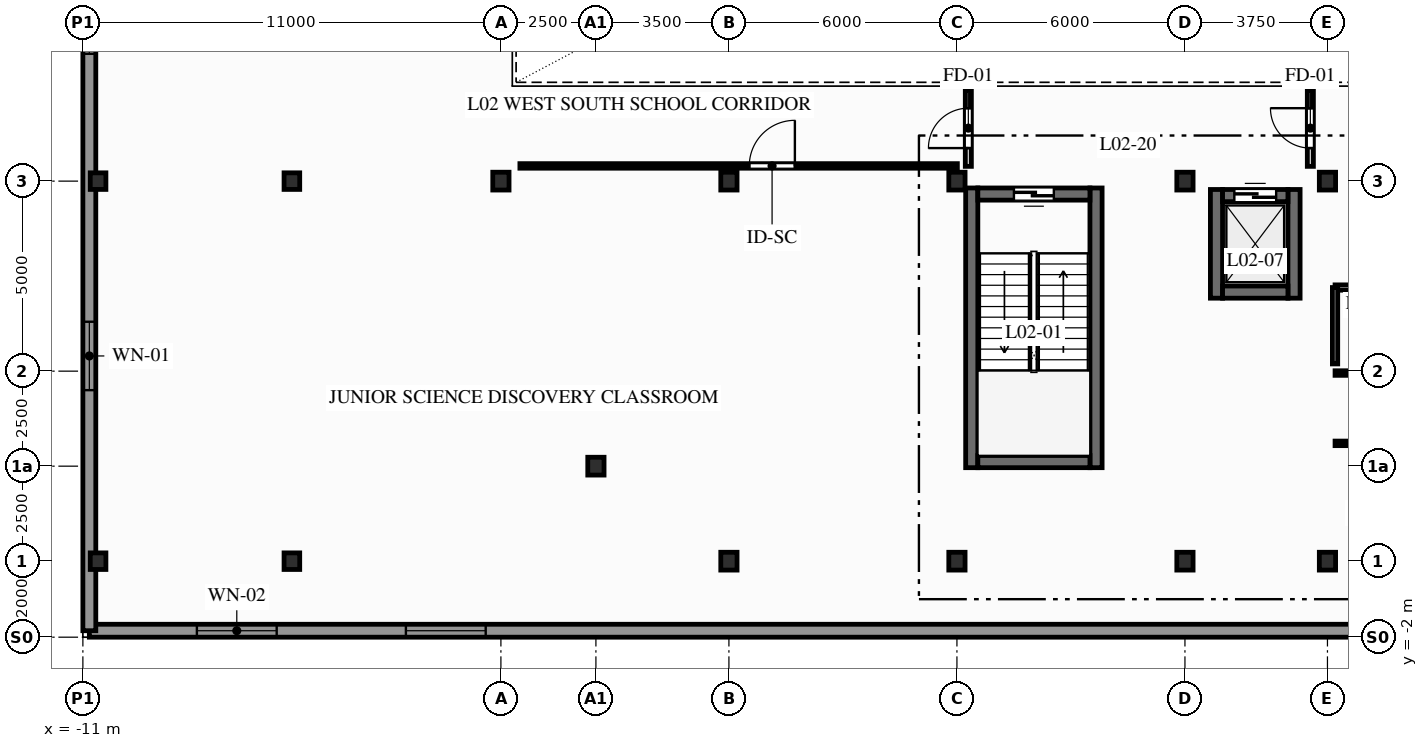
"""IFC4 building model, lengths in metres.
Left out: names, types, materials, properties, quantities, classifications, styles, units other than length and angle.
Written with IfcOpenShell. Run it as: python <this file> out.ifc"""

import sys

from ifc_helpers import new_model, si_unit, direction, frame, frame_2d, origin, origin_2d, place, context, subcontext, project, spatial, rectangle, i_section, extrude, element, fill, save


model = new_model("IFC4")
c1 = context("Model", 3, precision=1e-05, world=origin(), true_north=direction((0.0, 1.0)))
c2 = subcontext(c1, "Body", "Model", "MODEL_VIEW")
j1 = project(units=[si_unit("LENGTHUNIT", "METRE"), si_unit("PLANEANGLEUNIT", "RADIAN")], contexts=[c1])
p1 = place(None, origin())
s1 = spatial("IfcSite", under=j1, at=p1, CompositionType="ELEMENT")
p2 = place(p1, origin())
s2 = spatial("IfcBuilding", under=s1, at=p2, CompositionType="ELEMENT")
p3 = place(p2, frame((0.0, 0.0, 9.0)))
s3 = spatial("IfcBuildingStorey", under=s2, at=p3, CompositionType="ELEMENT", Elevation=9.0)
for number, where, z_axis, x_axis in (
    (1, (-10.6, 0.0, 0.0), (0.0, 0.0, 1.0), (1.0, 0.0, 0.0)),
    (2, (-10.6, 10.0, 0.0), (0.0, 0.0, 1.0), (1.0, 0.0, 0.0)),
    (3, (-5.5, 0.0, 0.0), (0.0, 0.0, 1.0), (1.0, 0.0, 0.0)),
    (4, (-5.5, 10.0, 0.0), (0.0, 0.0, 1.0), (1.0, 0.0, 0.0)),
):
    element("IfcColumn", number, at=place(p3, frame(where, z_axis=z_axis, x_axis=x_axis)), inside=s3, PredefinedType="COLUMN", context=c2, shape_type="SweptSolid", body=[
        extrude(i_section(OverallWidth=0.412, OverallDepth=0.437, WebThickness=0.036, FlangeThickness=0.058, FilletRadius=0.015, at=origin_2d()), origin(), (0.0, 0.0, 1.0), 4.5),
    ])
for number, where, z_axis, x_axis in (
    (5, (0.0, 10.0, 0.0), (0.0, 0.0, 1.0), (1.0, 0.0, 0.0)),
    (6, (2.5, 2.5, 0.0), (0.0, 0.0, 1.0), (1.0, 0.0, 0.0)),
    (7, (6.0, 0.0, 0.0), (0.0, 0.0, 1.0), (1.0, 0.0, 0.0)),
    (8, (6.0, 10.0, 0.0), (0.0, 0.0, 1.0), (1.0, 0.0, 0.0)),
    (9, (12.0, 0.0, 0.0), (0.0, 0.0, 1.0), (1.0, 0.0, 0.0)),
    (10, (12.0, 10.0, 0.0), (0.0, 0.0, 1.0), (1.0, 0.0, 0.0)),
    (11, (18.0, 0.0, 0.0), (0.0, 0.0, 1.0), (1.0, 0.0, 0.0)),
    (12, (18.0, 10.0, 0.0), (0.0, 0.0, 1.0), (1.0, 0.0, 0.0)),
    (13, (21.75, 0.0, 0.0), (0.0, 0.0, 1.0), (1.0, 0.0, 0.0)),
    (14, (21.75, 10.0, 0.0), (0.0, 0.0, 1.0), (1.0, 0.0, 0.0)),
):
    element("IfcColumn", number, at=place(p3, frame(where, z_axis=z_axis, x_axis=x_axis)), inside=s3, PredefinedType="COLUMN", context=c2, shape_type="SweptSolid", body=[
        extrude(i_section(OverallWidth=0.428, OverallDepth=0.469, WebThickness=0.078, FlangeThickness=0.125, FilletRadius=0.015, at=origin_2d()), origin(), (0.0, 0.0, 1.0), 4.5),
    ])
p4 = place(p3, frame((-10.83, -1.83, 0.0), z_axis=(0.0, 0.0, 1.0), x_axis=(1.0, 0.0, 0.0)))
e15 = element("IfcWall", 15, at=p4, inside=s3, PredefinedType="STANDARD", context=c2, shape_type="SweptSolid", body=[
    extrude(rectangle(XDim=81.66, YDim=0.34, at=frame_2d((40.83, 0.0))), origin(), (0.0, 0.0, 1.0), 4.22),
])
p5 = place(p4, frame((2.83, 0.0, 0.9)))
e16 = element("IfcOpeningElement", 16, at=p5, cuts=e15, PredefinedType="OPENING", context=c2, shape_type="SweptSolid", body=[
    extrude(rectangle(XDim=2.1, YDim=2.05, at=frame_2d((1.05, 1.025))), frame((0.0, 0.18, 0.0), z_axis=(0.0, -1.0, 0.0), x_axis=(1.0, 0.0, 0.0)), (0.0, 0.0, 1.0), 0.36),
])
p6 = place(p4, frame((8.33, 0.0, 0.9)))
e17 = element("IfcOpeningElement", 17, at=p6, cuts=e15, PredefinedType="OPENING", context=c2, shape_type="SweptSolid", body=[
    extrude(rectangle(XDim=2.1, YDim=2.05, at=frame_2d((1.05, 1.025))), frame((0.0, 0.18, 0.0), z_axis=(0.0, -1.0, 0.0), x_axis=(1.0, 0.0, 0.0)), (0.0, 0.0, 1.0), 0.36),
])
p7 = place(p4, frame((71.33, 0.0, 0.9)))
e18 = element("IfcOpeningElement", 18, at=p7, cuts=e15, PredefinedType="OPENING", context=c2, shape_type="SweptSolid", body=[
    extrude(rectangle(XDim=2.1, YDim=2.05, at=frame_2d((1.05, 1.025))), frame((0.0, 0.18, 0.0), z_axis=(0.0, -1.0, 0.0), x_axis=(1.0, 0.0, 0.0)), (0.0, 0.0, 1.0), 0.36),
])
p8 = place(p4, frame((76.83, 0.0, 0.9)))
e19 = element("IfcOpeningElement", 19, at=p8, cuts=e15, PredefinedType="OPENING", context=c2, shape_type="SweptSolid", body=[
    extrude(rectangle(XDim=2.1, YDim=2.05, at=frame_2d((1.05, 1.025))), frame((0.0, 0.18, 0.0), z_axis=(0.0, -1.0, 0.0), x_axis=(1.0, 0.0, 0.0)), (0.0, 0.0, 1.0), 0.36),
])
p9 = place(p3, frame((-10.83, 34.6, 0.0), z_axis=(0.0, 0.0, 1.0), x_axis=(0.0, -1.0, 0.0)))
e20 = element("IfcWall", 20, at=p9, inside=s3, PredefinedType="STANDARD", context=c2, shape_type="SweptSolid", body=[
    extrude(rectangle(XDim=36.43, YDim=0.34, at=frame_2d((18.215, 0.0))), origin(), (0.0, 0.0, 1.0), 3.583),
])
p10 = place(p9, frame((28.3, 0.0, 0.9)))
e21 = element("IfcOpeningElement", 21, at=p10, cuts=e20, PredefinedType="OPENING", context=c2, shape_type="SweptSolid", body=[
    extrude(rectangle(XDim=1.8, YDim=1.95, at=frame_2d((0.9, 0.975))), frame((0.0, 0.18, 0.0), z_axis=(0.0, -1.0, 0.0), x_axis=(1.0, 0.0, 0.0)), (0.0, 0.0, 1.0), 0.36),
])
p11 = place(p9, frame((19.45, 0.0, 0.9)))
e22 = element("IfcOpeningElement", 22, at=p11, cuts=e20, PredefinedType="OPENING", context=c2, shape_type="SweptSolid", body=[
    extrude(rectangle(XDim=1.8, YDim=1.95, at=frame_2d((0.9, 0.975))), frame((0.0, 0.18, 0.0), z_axis=(0.0, -1.0, 0.0), x_axis=(1.0, 0.0, 0.0)), (0.0, 0.0, 1.0), 0.36),
])
p12 = place(p9, frame((13.6, 0.0, 0.9)))
e23 = element("IfcOpeningElement", 23, at=p12, cuts=e20, PredefinedType="OPENING", context=c2, shape_type="SweptSolid", body=[
    extrude(rectangle(XDim=1.8, YDim=1.95, at=frame_2d((0.9, 0.975))), frame((0.0, 0.18, 0.0), z_axis=(0.0, -1.0, 0.0), x_axis=(1.0, 0.0, 0.0)), (0.0, 0.0, 1.0), 0.36),
])
p13 = place(p9, frame((6.0, 0.0, 0.9)))
e24 = element("IfcOpeningElement", 24, at=p13, cuts=e20, PredefinedType="OPENING", context=c2, shape_type="SweptSolid", body=[
    extrude(rectangle(XDim=1.8, YDim=1.95, at=frame_2d((0.9, 0.975))), frame((0.0, 0.18, 0.0), z_axis=(0.0, -1.0, 0.0), x_axis=(1.0, 0.0, 0.0)), (0.0, 0.0, 1.0), 0.36),
])
for number, where, z_axis, x_axis in (
    (25, (12.39, 2.46, 0.0), (0.0, 0.0, 1.0), (0.0, 1.0, 0.0)),
    (26, (15.66, 2.46, 0.0), (0.0, 0.0, 1.0), (0.0, 1.0, 0.0)),
):
    element("IfcWall", number, at=place(p3, frame(where, z_axis=z_axis, x_axis=x_axis)), inside=s3, PredefinedType="SHEAR", context=c2, shape_type="SweptSolid", body=[
        extrude(rectangle(XDim=7.36, YDim=0.32, at=frame_2d((3.68, 0.0))), origin(), (0.0, 0.0, 1.0), 4.22),
    ])
p14 = place(p3, frame((12.55, 2.62, 0.0), z_axis=(0.0, 0.0, 1.0), x_axis=(1.0, 0.0, 0.0)))
e27 = element("IfcWall", 27, at=p14, inside=s3, PredefinedType="SHEAR", context=c2, shape_type="SweptSolid", body=[
    extrude(rectangle(XDim=2.95, YDim=0.32, at=frame_2d((1.475, 0.0))), origin(), (0.0, 0.0, 1.0), 4.22),
])
p15 = place(p3, frame((15.5, 9.66, 0.0), z_axis=(0.0, 0.0, 1.0), x_axis=(-1.0, 0.0, 0.0)))
e28 = element("IfcWall", 28, at=p15, inside=s3, PredefinedType="SHEAR", context=c2, shape_type="SweptSolid", body=[
    extrude(rectangle(XDim=2.95, YDim=0.32, at=frame_2d((1.475, 0.0))), origin(), (0.0, 0.0, 1.0), 4.22),
])
p16 = place(p15, frame((0.95, 0.0, 0.0)))
e29 = element("IfcOpeningElement", 29, at=p16, cuts=e28, PredefinedType="OPENING", context=c2, shape_type="SweptSolid", body=[
    extrude(rectangle(XDim=1.05, YDim=2.06, at=frame_2d((0.525, 1.03))), frame((0.0, 0.17, 0.0), z_axis=(0.0, -1.0, 0.0), x_axis=(1.0, 0.0, 0.0)), (0.0, 0.0, 1.0), 0.34),
])
for number, where, z_axis, x_axis in (
    (30, (18.83, 6.92, 0.0), (0.0, 0.0, 1.0), (0.0, 1.0, 0.0)),
    (31, (20.87, 6.92, 0.0), (0.0, 0.0, 1.0), (0.0, 1.0, 0.0)),
):
    element("IfcWall", number, at=place(p3, frame(where, z_axis=z_axis, x_axis=x_axis)), inside=s3, PredefinedType="SHEAR", context=c2, shape_type="SweptSolid", body=[
        extrude(rectangle(XDim=2.86, YDim=0.32, at=frame_2d((1.43, 0.0))), origin(), (0.0, 0.0, 1.0), 4.22),
    ])
p17 = place(p3, frame((18.99, 7.08, 0.0), z_axis=(0.0, 0.0, 1.0), x_axis=(1.0, 0.0, 0.0)))
e32 = element("IfcWall", 32, at=p17, inside=s3, PredefinedType="SHEAR", context=c2, shape_type="SweptSolid", body=[
    extrude(rectangle(XDim=1.72, YDim=0.32, at=frame_2d((0.86, 0.0))), origin(), (0.0, 0.0, 1.0), 4.22),
])
p18 = place(p3, frame((18.99, 9.62, 0.0), z_axis=(0.0, 0.0, 1.0), x_axis=(1.0, 0.0, 0.0)))
e33 = element("IfcWall", 33, at=p18, inside=s3, PredefinedType="SHEAR", context=c2, shape_type="SweptSolid", body=[
    extrude(rectangle(XDim=1.72, YDim=0.32, at=frame_2d((0.86, 0.0))), origin(), (0.0, 0.0, 1.0), 4.22),
])
p19 = place(p18, frame((0.31, 0.0, 0.0)))
e34 = element("IfcOpeningElement", 34, at=p19, cuts=e33, PredefinedType="OPENING", context=c2, shape_type="SweptSolid", body=[
    extrude(rectangle(XDim=1.1, YDim=2.06, at=frame_2d((0.55, 1.03))), frame((0.0, 0.17, 0.0), z_axis=(0.0, -1.0, 0.0), x_axis=(1.0, 0.0, 0.0)), (0.0, 0.0, 1.0), 0.34),
])
p20 = place(p3, frame((21.95, 3.1, 0.0), z_axis=(0.0, 0.0, 1.0), x_axis=(1.0, 0.0, 0.0)))
e35 = element("IfcWall", 35, at=p20, inside=s3, PredefinedType="PARTITIONING", context=c2, shape_type="SweptSolid", body=[
    extrude(rectangle(XDim=3.781, YDim=0.12, at=frame_2d((1.891, 0.0))), origin(), (0.0, 0.0, 1.0), 4.22),
])
p21 = place(p20, frame((1.366, 0.0, 0.0)))
e36 = element("IfcOpeningElement", 36, at=p21, cuts=e35, PredefinedType="OPENING", context=c2, shape_type="SweptSolid", body=[
    extrude(rectangle(XDim=1.05, YDim=2.06, at=frame_2d((0.525, 1.03))), frame((0.0, 0.07, 0.0), z_axis=(0.0, -1.0, 0.0), x_axis=(1.0, 0.0, 0.0)), (0.0, 0.0, 1.0), 0.14),
])
p22 = place(p3, frame((21.95, 4.95, 0.0), z_axis=(0.0, 0.0, 1.0), x_axis=(1.0, 0.0, 0.0)))
e37 = element("IfcWall", 37, at=p22, inside=s3, PredefinedType="PARTITIONING", context=c2, shape_type="SweptSolid", body=[
    extrude(rectangle(XDim=5.231, YDim=0.12, at=frame_2d((2.616, 0.0))), origin(), (0.0, 0.0, 1.0), 3.738),
])
p23 = place(p22, frame((2.141, 0.0, 0.0)))
e38 = element("IfcOpeningElement", 38, at=p23, cuts=e37, PredefinedType="OPENING", context=c2, shape_type="SweptSolid", body=[
    extrude(rectangle(XDim=0.95, YDim=2.05, at=frame_2d((0.475, 1.025))), frame((0.0, 0.07, 0.0), z_axis=(0.0, -1.0, 0.0), x_axis=(1.0, 0.0, 0.0)), (0.0, 0.0, 1.0), 0.14),
])
p24 = place(p3, frame((12.3, 10.389, 0.0), z_axis=(0.0, 0.0, 1.0), x_axis=(0.0, 1.0, 0.0)))
e39 = element("IfcWall", 39, at=p24, inside=s3, PredefinedType="PARTITIONING", context=c2, shape_type="SweptSolid", body=[
    extrude(rectangle(XDim=2.011, YDim=0.16, at=frame_2d((1.006, 0.0))), origin(), (0.0, 0.0, 1.0), 4.22),
])
p25 = place(p24, frame((0.481, 0.0, 0.0)))
e40 = element("IfcOpeningElement", 40, at=p25, cuts=e39, PredefinedType="OPENING", context=c2, shape_type="SweptSolid", body=[
    extrude(rectangle(XDim=1.05, YDim=2.06, at=frame_2d((0.525, 1.03))), frame((0.0, 0.09, 0.0), z_axis=(0.0, -1.0, 0.0), x_axis=(1.0, 0.0, 0.0)), (0.0, 0.0, 1.0), 0.18),
])
p26 = place(p3, frame((21.3, 10.389, 0.0), z_axis=(0.0, 0.0, 1.0), x_axis=(0.0, 1.0, 0.0)))
e41 = element("IfcWall", 41, at=p26, inside=s3, PredefinedType="PARTITIONING", context=c2, shape_type="SweptSolid", body=[
    extrude(rectangle(XDim=2.011, YDim=0.16, at=frame_2d((1.006, 0.0))), origin(), (0.0, 0.0, 1.0), 4.22),
])
p27 = place(p26, frame((0.481, 0.0, 0.0)))
e42 = element("IfcOpeningElement", 42, at=p27, cuts=e41, PredefinedType="OPENING", context=c2, shape_type="SweptSolid", body=[
    extrude(rectangle(XDim=1.05, YDim=2.06, at=frame_2d((0.525, 1.03))), frame((0.0, 0.09, 0.0), z_axis=(0.0, -1.0, 0.0), x_axis=(1.0, 0.0, 0.0)), (0.0, 0.0, 1.0), 0.18),
])
p28 = place(p3, frame((0.5, 10.4, 0.0), z_axis=(0.0, 0.0, 1.0), x_axis=(1.0, 0.0, 0.0)))
e43 = element("IfcWall", 43, at=p28, inside=s3, PredefinedType="PARTITIONING", context=c2, shape_type="SweptSolid", body=[
    extrude(rectangle(XDim=11.511, YDim=0.12, at=frame_2d((5.756, 0.0))), origin(), (0.0, 0.0, 1.0), 3.344),
])
p29 = place(p28, frame((6.036, 0.0, 0.0)))
e44 = element("IfcOpeningElement", 44, at=p29, cuts=e43, PredefinedType="OPENING", context=c2, shape_type="SweptSolid", body=[
    extrude(rectangle(XDim=1.2, YDim=2.08, at=frame_2d((0.6, 1.04))), frame((0.0, 0.07, 0.0), z_axis=(0.0, -1.0, 0.0), x_axis=(1.0, 0.0, 0.0)), (0.0, 0.0, 1.0), 0.14),
])
p30 = place(p3, frame((21.95, 7.2, 0.0), z_axis=(0.0, 0.0, 1.0), x_axis=(1.0, 0.0, 0.0)))
e45 = element("IfcWall", 45, at=p30, inside=s3, PredefinedType="PARTITIONING", context=c2, shape_type="SweptSolid", body=[
    extrude(rectangle(XDim=4.98, YDim=0.14, at=frame_2d((2.49, 0.0))), origin(), (0.0, 0.0, 1.0), 4.22),
])
p31 = place(p3, frame((21.95, 5.19, 0.0), z_axis=(0.0, 0.0, 1.0), x_axis=(0.0, 1.0, 0.0)))
e46 = element("IfcWall", 46, at=p31, inside=s3, PredefinedType="PARTITIONING", context=c2, shape_type="SweptSolid", body=[
    extrude(rectangle(XDim=2.01, YDim=0.14, at=frame_2d((1.005, 0.0))), origin(), (0.0, 0.0, 1.0), 3.344),
])
p32 = place(p5, origin())
e47 = element("IfcWindow", 47, at=p32, inside=s3, PartitioningType="SINGLE_PANEL", PredefinedType="WINDOW", context=c2, shape_type="SweptSolid", body=[
    extrude(rectangle(XDim=2.1, YDim=2.05, at=frame_2d((1.05, 1.025))), frame((0.0, 0.03, 0.0), z_axis=(0.0, -1.0, 0.0), x_axis=(1.0, 0.0, 0.0)), (0.0, 0.0, 1.0), 0.06),
])
fill(e16, e47)
p33 = place(p6, origin())
e48 = element("IfcWindow", 48, at=p33, inside=s3, PartitioningType="SINGLE_PANEL", PredefinedType="WINDOW", context=c2, shape_type="SweptSolid", body=[
    extrude(rectangle(XDim=2.1, YDim=2.05, at=frame_2d((1.05, 1.025))), frame((0.0, 0.03, 0.0), z_axis=(0.0, -1.0, 0.0), x_axis=(1.0, 0.0, 0.0)), (0.0, 0.0, 1.0), 0.06),
])
fill(e17, e48)
p34 = place(p10, origin())
e49 = element("IfcWindow", 49, at=p34, inside=s3, PartitioningType="SINGLE_PANEL", PredefinedType="WINDOW", context=c2, shape_type="SweptSolid", body=[
    extrude(rectangle(XDim=1.8, YDim=1.95, at=frame_2d((0.9, 0.975))), frame((0.0, 0.03, 0.0), z_axis=(0.0, -1.0, 0.0), x_axis=(1.0, 0.0, 0.0)), (0.0, 0.0, 1.0), 0.06),
])
fill(e21, e49)
p35 = place(p11, origin())
e50 = element("IfcWindow", 50, at=p35, inside=s3, PartitioningType="SINGLE_PANEL", PredefinedType="WINDOW", context=c2, shape_type="SweptSolid", body=[
    extrude(rectangle(XDim=1.8, YDim=1.95, at=frame_2d((0.9, 0.975))), frame((0.0, 0.03, 0.0), z_axis=(0.0, -1.0, 0.0), x_axis=(1.0, 0.0, 0.0)), (0.0, 0.0, 1.0), 0.06),
])
fill(e22, e50)
p36 = place(p16, origin())
e51 = element("IfcDoor", 51, at=p36, inside=s3, OperationType="SINGLE_SWING_RIGHT", PredefinedType="DOOR", context=c2, shape_type="SweptSolid", body=[
    extrude(rectangle(XDim=1.05, YDim=2.06, at=frame_2d((0.525, 1.03))), frame((0.0, 0.025, 0.0), z_axis=(0.0, -1.0, 0.0), x_axis=(1.0, 0.0, 0.0)), (0.0, 0.0, 1.0), 0.05),
])
fill(e29, e51)
p37 = place(p19, origin())
e52 = element("IfcDoor", 52, at=p37, inside=s3, OperationType="SLIDING_TO_RIGHT", PredefinedType="DOOR", context=c2, shape_type="SweptSolid", body=[
    extrude(rectangle(XDim=1.1, YDim=2.06, at=frame_2d((0.55, 1.03))), frame((0.0, 0.025, 0.0), z_axis=(0.0, -1.0, 0.0), x_axis=(1.0, 0.0, 0.0)), (0.0, 0.0, 1.0), 0.05),
])
fill(e34, e52)
p38 = place(p25, origin())
e53 = element("IfcDoor", 53, at=p38, inside=s3, OperationType="SINGLE_SWING_LEFT", PredefinedType="DOOR", context=c2, shape_type="SweptSolid", body=[
    extrude(rectangle(XDim=1.05, YDim=2.06, at=frame_2d((0.525, 1.03))), frame((0.0, 0.025, 0.0), z_axis=(0.0, -1.0, 0.0), x_axis=(1.0, 0.0, 0.0)), (0.0, 0.0, 1.0), 0.05),
])
fill(e40, e53)
p39 = place(p27, origin())
e54 = element("IfcDoor", 54, at=p39, inside=s3, OperationType="SINGLE_SWING_RIGHT", PredefinedType="DOOR", context=c2, shape_type="SweptSolid", body=[
    extrude(rectangle(XDim=1.05, YDim=2.06, at=frame_2d((0.525, 1.03))), frame((0.0, 0.025, 0.0), z_axis=(0.0, -1.0, 0.0), x_axis=(1.0, 0.0, 0.0)), (0.0, 0.0, 1.0), 0.05),
])
fill(e42, e54)
p40 = place(p29, origin())
e55 = element("IfcDoor", 55, at=p40, inside=s3, OperationType="SINGLE_SWING_RIGHT", PredefinedType="DOOR", context=c2, shape_type="SweptSolid", body=[
    extrude(rectangle(XDim=1.2, YDim=2.08, at=frame_2d((0.6, 1.04))), frame((0.0, 0.025, 0.0), z_axis=(0.0, -1.0, 0.0), x_axis=(1.0, 0.0, 0.0)), (0.0, 0.0, 1.0), 0.05),
])
fill(e44, e55)
save(model, sys.argv[1])
